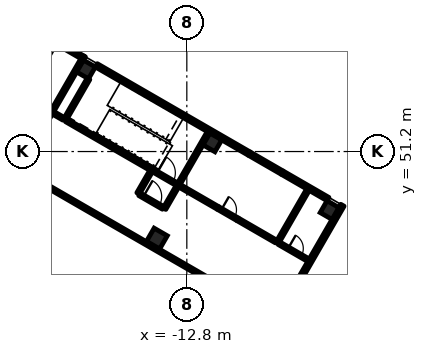
"""IFC4 building model, lengths in metres.
Left out: names, types, materials, properties, quantities, classifications, styles, units other than length and angle.
Written with IfcOpenShell. Run it as: python <this file> out.ifc"""

import sys

from ifc_helpers import new_model, si_unit, direction, frame, frame_2d, origin, origin_2d, place, context, subcontext, project, spatial, rectangle, extrude, element, fill, save


model = new_model("IFC4")
c1 = context("Model", 3, precision=1e-05, world=origin(), true_north=direction((0.0, 1.0)))
c2 = subcontext(c1, "Body", "Model", "MODEL_VIEW")
j1 = project(units=[si_unit("LENGTHUNIT", "METRE"), si_unit("PLANEANGLEUNIT", "RADIAN")], contexts=[c1])
p1 = place(None, origin())
s1 = spatial("IfcSite", under=j1, at=p1, CompositionType="ELEMENT")
p2 = place(p1, origin())
s2 = spatial("IfcBuilding", under=s1, at=p2, CompositionType="ELEMENT")
p3 = place(p2, frame((0.0, 0.0, 6.0)))
s3 = spatial("IfcBuildingStorey", under=s2, at=p3, CompositionType="ELEMENT", Elevation=6.0)
for number, where, z_axis, x_axis in (
    (1, (-3.41, 47.349, 0.0), (0.0, 0.0, 1.0), (-0.5, -0.866, 0.0)),
    (2, (-11.118, 51.799, 0.0), (0.0, 0.0, 1.0), (-0.5, -0.866, 0.0)),
    (3, (-19.432, 56.599, 0.0), (0.0, 0.0, 1.0), (-0.5, -0.866, 0.0)),
):
    element("IfcColumn", number, at=place(p3, frame(where, z_axis=z_axis, x_axis=x_axis)), inside=s3, PredefinedType="COLUMN", context=c2, shape_type="SweptSolid", body=[
        extrude(rectangle(XDim=0.9, YDim=0.9, at=origin_2d()), origin(), (0.0, 0.0, 1.0), 5.4),
    ])
p4 = place(p3, frame((-14.768, 45.477, 0.0), z_axis=(0.0, 0.0, 1.0), x_axis=(-0.5, -0.866025403784, 0.0)))
e4 = element("IfcColumn", 4, at=p4, inside=s3, PredefinedType="COLUMN", context=c2, shape_type="SweptSolid", body=[
    extrude(rectangle(XDim=1.0, YDim=1.0, at=origin_2d()), origin(), (0.0, 0.0, 1.0), 5.4),
])
p5 = place(p3, frame((-2.562, 47.667, 0.0), z_axis=(0.0, 0.0, 1.0), x_axis=(-0.500001855621, -0.866024332438, 0.0)))
e5 = element("IfcWall", 5, at=p5, inside=s3, PredefinedType="SOLIDWALL", context=c2, shape_type="SweptSolid", body=[
    extrude(rectangle(XDim=10.312, YDim=0.25, at=frame_2d((5.156, 0.0))), origin(), (0.0, 0.0, 1.0), 5.1),
])
p6 = place(p3, frame((-6.522, 49.809, 0.0), z_axis=(0.0, 0.0, 1.0), x_axis=(0.866055725969, -0.499947476758, 0.0)))
e6 = element("IfcWall", 6, at=p6, inside=s3, PredefinedType="SOLIDWALL", context=c2, shape_type="SweptSolid", body=[
    extrude(rectangle(XDim=3.475, YDim=0.25, at=frame_2d((1.737, 0.0))), origin(), (0.0, 0.0, 1.0), 5.1),
])
p7 = place(p3, frame((-8.687, 51.059, 0.0), z_axis=(0.0, 0.0, 1.0), x_axis=(0.866022959057, -0.500004234368, 0.0)))
e7 = element("IfcWall", 7, at=p7, inside=s3, PredefinedType="SOLIDWALL", context=c2, shape_type="SweptSolid", body=[
    extrude(rectangle(XDim=2.5, YDim=0.25, at=frame_2d((1.25, 0.0))), origin(), (0.0, 0.0, 1.0), 5.1),
])
p8 = place(p7, frame((0.25, 0.0, 0.9)))
e8 = element("IfcOpeningElement", 8, at=p8, cuts=e7, PredefinedType="OPENING", context=c2, shape_type="SweptSolid", body=[
    extrude(rectangle(XDim=2.0, YDim=1.8, at=frame_2d((1.0, 0.9))), frame((0.0, 0.135, 0.0), z_axis=(0.0, -1.0, 0.0), x_axis=(1.0, 0.0, 0.0)), (0.0, 0.0, 1.0), 0.27),
])
p9 = place(p3, frame((-18.755, 56.872, 0.0), z_axis=(0.0, 0.0, 1.0), x_axis=(0.866027159341, -0.499996959274, 0.0)))
e9 = element("IfcWall", 9, at=p9, inside=s3, PredefinedType="SOLIDWALL", context=c2, shape_type="SweptSolid", body=[
    extrude(rectangle(XDim=11.625, YDim=0.25, at=frame_2d((5.812, 0.0))), origin(), (0.0, 0.0, 1.0), 5.1),
])
p10 = place(p3, frame((-27.069, 61.672, 0.0), z_axis=(0.0, 0.0, 1.0), x_axis=(0.866021068297, -0.500007509209, 0.0)))
e10 = element("IfcWall", 10, at=p10, inside=s3, PredefinedType="SOLIDWALL", context=c2, shape_type="SweptSolid", body=[
    extrude(rectangle(XDim=8.6, YDim=0.25, at=frame_2d((4.3, 0.0))), origin(), (0.0, 0.0, 1.0), 5.1),
])
p11 = place(p3, frame((-19.621, 57.372, 0.0), z_axis=(0.0, 0.0, 1.0), x_axis=(0.867038199201, -0.4982416694, 0.0)))
e11 = element("IfcWall", 11, at=p11, inside=s3, PredefinedType="SOLIDWALL", context=c2, shape_type="SweptSolid", body=[
    extrude(rectangle(XDim=0.1, YDim=0.25, at=frame_2d((0.05, 0.0))), origin(), (0.0, 0.0, 1.0), 5.1),
])
p12 = place(p3, frame((-11.369, 52.463, 0.0), z_axis=(0.0, 0.0, 1.0), x_axis=(-0.50002537861, -0.866010750942, 0.0)))
e12 = element("IfcWall", 12, at=p12, inside=s3, PredefinedType="SOLIDWALL", context=c2, shape_type="SweptSolid", body=[
    extrude(rectangle(XDim=4.0, YDim=0.2, at=frame_2d((2.0, 0.0))), origin(), (0.0, 0.0, 1.0), 5.1),
])
p13 = place(p3, frame((-19.267, 55.984, 0.0), z_axis=(0.0, 0.0, 1.0), x_axis=(-0.49999285859, -0.86602952684, 0.0)))
e13 = element("IfcWall", 13, at=p13, inside=s3, PredefinedType="SOLIDWALL", context=c2, shape_type="SweptSolid", body=[
    extrude(rectangle(XDim=3.1, YDim=0.2, at=frame_2d((1.55, 0.0))), origin(), (0.0, 0.0, 1.0), 5.1),
])
p14 = place(p3, frame((-19.683, 57.263, 0.0), z_axis=(0.0, 0.0, 1.0), x_axis=(-0.49999894854, -0.866026010844, 0.0)))
e14 = element("IfcWall", 14, at=p14, inside=s3, PredefinedType="SOLIDWALL", context=c2, shape_type="SweptSolid", body=[
    extrude(rectangle(XDim=4.0, YDim=0.2, at=frame_2d((2.0, 0.0))), origin(), (0.0, 0.0, 1.0), 5.1),
])
p15 = place(p3, frame((-14.972, 49.924, 0.0), z_axis=(0.0, 0.0, 1.0), x_axis=(0.866036909293, -0.499980071345, 0.0)))
e15 = element("IfcWall", 15, at=p15, inside=s3, PredefinedType="SOLIDWALL", context=c2, shape_type="SweptSolid", body=[
    extrude(rectangle(XDim=1.75, YDim=0.2, at=frame_2d((0.875, 0.0))), origin(), (0.0, 0.0, 1.0), 5.1),
])
p16 = place(p15, frame((0.25, 0.0, 0.0)))
e16 = element("IfcOpeningElement", 16, at=p16, cuts=e15, PredefinedType="OPENING", context=c2, shape_type="SweptSolid", body=[
    extrude(rectangle(XDim=1.2, YDim=2.1, at=frame_2d((0.6, 1.05))), frame((0.0, 0.11, 0.0), z_axis=(0.0, -1.0, 0.0), x_axis=(1.0, 0.0, 0.0)), (0.0, 0.0, 1.0), 0.22),
])
p17 = place(p3, frame((-14.972, 49.924, 0.0), z_axis=(0.0, 0.0, 1.0), x_axis=(-0.86601134256, 0.500024353964, 0.0)))
e17 = element("IfcWall", 17, at=p17, inside=s3, PredefinedType="SOLIDWALL", context=c2, shape_type="SweptSolid", body=[
    extrude(rectangle(XDim=6.65, YDim=0.2, at=frame_2d((3.325, 0.0))), origin(), (0.0, 0.0, 1.0), 5.1),
])
p18 = place(p3, frame((-13.419, 48.913, 0.0), z_axis=(0.0, 0.0, 1.0), x_axis=(-0.500000056704, -0.866025371046, 0.0)))
e18 = element("IfcWall", 18, at=p18, inside=s3, PredefinedType="PARTITIONING", context=c2, shape_type="SweptSolid", body=[
    extrude(rectangle(XDim=1.7, YDim=0.2, at=frame_2d((0.85, 0.0))), origin(), (0.0, 0.0, 1.0), 4.5),
])
for number, where, z_axis, x_axis in (
    (19, (-15.152, 49.913, 0.0), (0.0, 0.0, 1.0), (-0.5, -0.866, 0.0)),
    (20, (-21.733, 53.713, 0.0), (0.0, 0.0, 1.0), (-0.5, -0.866, 0.0)),
):
    element("IfcWall", number, at=place(p3, frame(where, z_axis=z_axis, x_axis=x_axis)), inside=s3, PredefinedType="PARTITIONING", context=c2, shape_type="SweptSolid", body=[
        extrude(rectangle(XDim=1.7, YDim=0.2, at=frame_2d((0.85, 0.0))), origin(), (0.0, 0.0, 1.0), 4.5),
    ])
p19 = place(p3, frame((-15.915, 48.39, 0.0), z_axis=(0.0, 0.0, 1.0), x_axis=(0.866013897511, -0.50001992892, 0.0)))
e21 = element("IfcWall", 21, at=p19, inside=s3, PredefinedType="PARTITIONING", context=c2, shape_type="SweptSolid", body=[
    extrude(rectangle(XDim=1.8, YDim=0.2, at=frame_2d((0.9, 0.0))), origin(), (0.0, 0.0, 1.0), 4.5),
])
p20 = place(p19, frame((0.3, 0.0, 0.0)))
e22 = element("IfcOpeningElement", 22, at=p20, cuts=e21, PredefinedType="OPENING", context=c2, shape_type="SweptSolid", body=[
    extrude(rectangle(XDim=1.2, YDim=2.1, at=frame_2d((0.6, 1.05))), frame((0.0, 0.11, 0.0), z_axis=(0.0, -1.0, 0.0), x_axis=(1.0, 0.0, 0.0)), (0.0, 0.0, 1.0), 0.22),
])
p21 = place(p3, frame((-4.831, 48.688, 0.0), z_axis=(0.0, 0.0, 1.0), x_axis=(-0.49999894854, -0.866026010844, 0.0)))
e23 = element("IfcWall", 23, at=p21, inside=s3, PredefinedType="PARTITIONING", context=c2, shape_type="SweptSolid", body=[
    extrude(rectangle(XDim=4.0, YDim=0.2, at=frame_2d((2.0, 0.0))), origin(), (0.0, 0.0, 1.0), 4.5),
])
p22 = place(p3, frame((-6.744, 45.174, 0.0), z_axis=(0.0, 0.0, 1.0), x_axis=(0.866017533419, -0.500013631625, 0.0)))
e24 = element("IfcWall", 24, at=p22, inside=s3, PredefinedType="PARTITIONING", context=c2, shape_type="SweptSolid", body=[
    extrude(rectangle(XDim=2.25, YDim=0.2, at=frame_2d((1.125, 0.0))), origin(), (0.0, 0.0, 1.0), 4.5),
])
p23 = place(p22, frame((0.7, 0.0, 0.0)))
e25 = element("IfcOpeningElement", 25, at=p23, cuts=e24, PredefinedType="OPENING", context=c2, shape_type="SweptSolid", body=[
    extrude(rectangle(XDim=1.0, YDim=2.1, at=frame_2d((0.5, 1.05))), frame((0.0, 0.11, 0.0), z_axis=(0.0, -1.0, 0.0), x_axis=(1.0, 0.0, 0.0)), (0.0, 0.0, 1.0), 0.22),
])
p24 = place(p3, frame((-6.917, 45.274, 0.0), z_axis=(0.0, 0.0, 1.0), x_axis=(-0.866046596414, 0.499963291492, 0.0)))
e26 = element("IfcWall", 26, at=p24, inside=s3, PredefinedType="PARTITIONING", context=c2, shape_type="SweptSolid", body=[
    extrude(rectangle(XDim=2.925, YDim=0.2, at=frame_2d((1.462, 0.0))), origin(), (0.0, 0.0, 1.0), 4.5),
])
p25 = place(p3, frame((-10.75, 47.487, 0.0), z_axis=(0.0, 0.0, 1.0), x_axis=(0.866031096941, -0.499990139034, 0.0)))
e27 = element("IfcWall", 27, at=p25, inside=s3, PredefinedType="PARTITIONING", context=c2, shape_type="SweptSolid", body=[
    extrude(rectangle(XDim=1.5, YDim=0.2, at=frame_2d((0.75, 0.0))), origin(), (0.0, 0.0, 1.0), 4.5),
])
p26 = place(p25, frame((0.25, 0.0, 0.0)))
e28 = element("IfcOpeningElement", 28, at=p26, cuts=e27, PredefinedType="OPENING", context=c2, shape_type="SweptSolid", body=[
    extrude(rectangle(XDim=1.0, YDim=2.1, at=frame_2d((0.5, 1.05))), frame((0.0, 0.11, 0.0), z_axis=(0.0, -1.0, 0.0), x_axis=(1.0, 0.0, 0.0)), (0.0, 0.0, 1.0), 0.22),
])
p27 = place(p3, frame((-10.75, 47.487, 0.0), z_axis=(0.0, 0.0, 1.0), x_axis=(-0.86601045545, 0.500025890382, 0.0)))
e29 = element("IfcWall", 29, at=p27, inside=s3, PredefinedType="PARTITIONING", context=c2, shape_type="SweptSolid", body=[
    extrude(rectangle(XDim=2.925, YDim=0.2, at=frame_2d((1.462, 0.0))), origin(), (0.0, 0.0, 1.0), 4.5),
])
p28 = place(p3, frame((-20.904, 53.349, 0.0), z_axis=(0.0, 0.0, 1.0), x_axis=(-0.865961984968, 0.500109828528, 0.0)))
e30 = element("IfcWall", 30, at=p28, inside=s3, PredefinedType="PARTITIONING", context=c2, shape_type="SweptSolid", body=[
    extrude(rectangle(XDim=0.8, YDim=0.2, at=frame_2d((0.4, 0.0))), origin(), (0.0, 0.0, 1.0), 4.5),
])
p29 = place(p3, frame((-10.491, 42.285, 0.0), z_axis=(0.0, 0.0, 1.0), x_axis=(-0.866022857395, 0.50000441045, 0.0)))
e31 = element("IfcWall", 31, at=p29, inside=s3, PredefinedType="PARTITIONING", context=c2, shape_type="SweptSolid", body=[
    extrude(rectangle(XDim=39.4, YDim=0.2, at=frame_2d((19.7, 0.0))), origin(), (0.0, 0.0, 1.0), 4.5),
])
p30 = place(p8, origin())
e32 = element("IfcWindow", 32, at=p30, inside=s3, PartitioningType="SINGLE_PANEL", PredefinedType="WINDOW", context=c2, shape_type="SweptSolid", body=[
    extrude(rectangle(XDim=2.0, YDim=1.8, at=frame_2d((1.0, 0.9))), frame((0.0, 0.03, 0.0), z_axis=(0.0, -1.0, 0.0), x_axis=(1.0, 0.0, 0.0)), (0.0, 0.0, 1.0), 0.06),
])
fill(e8, e32)
p31 = place(p16, origin())
e33 = element("IfcDoor", 33, at=p31, inside=s3, OperationType="SINGLE_SWING_LEFT", PredefinedType="DOOR", context=c2, shape_type="SweptSolid", body=[
    extrude(rectangle(XDim=1.2, YDim=2.1, at=frame_2d((0.6, 1.05))), frame((0.0, 0.025, 0.0), z_axis=(0.0, -1.0, 0.0), x_axis=(1.0, 0.0, 0.0)), (0.0, 0.0, 1.0), 0.05),
])
fill(e16, e33)
p32 = place(p20, origin())
e34 = element("IfcDoor", 34, at=p32, inside=s3, OperationType="SINGLE_SWING_LEFT", PredefinedType="DOOR", context=c2, shape_type="SweptSolid", body=[
    extrude(rectangle(XDim=1.2, YDim=2.1, at=frame_2d((0.6, 1.05))), frame((0.0, 0.025, 0.0), z_axis=(0.0, -1.0, 0.0), x_axis=(1.0, 0.0, 0.0)), (0.0, 0.0, 1.0), 0.05),
])
fill(e22, e34)
p33 = place(p23, origin())
e35 = element("IfcDoor", 35, at=p33, inside=s3, OperationType="SINGLE_SWING_LEFT", PredefinedType="DOOR", context=c2, shape_type="SweptSolid", body=[
    extrude(rectangle(XDim=1.0, YDim=2.1, at=frame_2d((0.5, 1.05))), frame((0.0, 0.025, 0.0), z_axis=(0.0, -1.0, 0.0), x_axis=(1.0, 0.0, 0.0)), (0.0, 0.0, 1.0), 0.05),
])
fill(e25, e35)
p34 = place(p26, origin())
e36 = element("IfcDoor", 36, at=p34, inside=s3, OperationType="SINGLE_SWING_LEFT", PredefinedType="DOOR", context=c2, shape_type="SweptSolid", body=[
    extrude(rectangle(XDim=1.0, YDim=2.1, at=frame_2d((0.5, 1.05))), frame((0.0, 0.025, 0.0), z_axis=(0.0, -1.0, 0.0), x_axis=(1.0, 0.0, 0.0)), (0.0, 0.0, 1.0), 0.05),
])
fill(e28, e36)
save(model, sys.argv[1])
